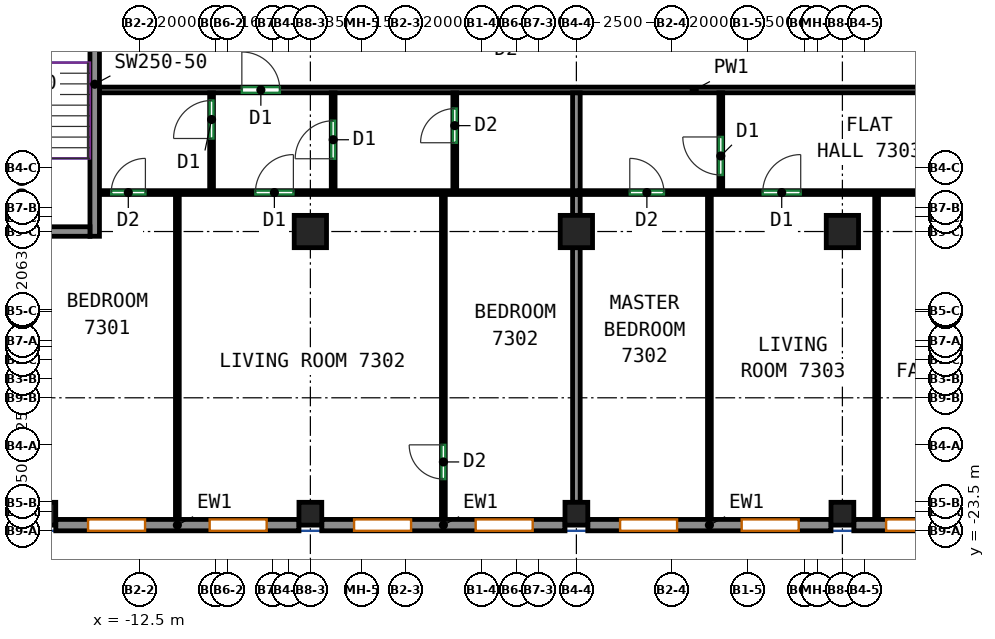
"""IFC4 building model, lengths in metres.
Left out: names, types, materials, properties, quantities, classifications, styles, units other than length and angle.
Written with IfcOpenShell. Run it as: python <this file> out.ifc"""

import sys

from ifc_helpers import new_model, si_unit, direction, frame, frame_2d, origin, origin_2d, place, context, subcontext, project, spatial, rectangle, extrude, source, transform, mapped, element, fill, save


model = new_model("IFC4")
c1 = context("Model", 3, precision=1e-05, world=origin(), true_north=direction((0.0, 1.0)))
c2 = subcontext(c1, "Body", "Model", "MODEL_VIEW")
j1 = project(units=[si_unit("LENGTHUNIT", "METRE"), si_unit("PLANEANGLEUNIT", "RADIAN")], contexts=[c1])
p1 = place(None, origin())
s1 = spatial("IfcSite", under=j1, at=p1, CompositionType="ELEMENT")
p2 = place(p1, origin())
s2 = spatial("IfcBuilding", under=s1, at=p2, CompositionType="ELEMENT")
p3 = place(p2, frame((0.0, 0.0, 295.0)))
s3 = spatial("IfcBuildingStorey", under=s2, at=p3, CompositionType="ELEMENT", Elevation=295.0)
m1 = source(origin(), c2, "Body", "SweptSolid", [
    extrude(rectangle(XDim=0.6, YDim=0.6, at=origin_2d()), origin(), (0.0, 0.0, 1.0), 3.12),
])
for number, where, z_axis, x_axis in (
    (1, (-15.0, -23.05, 0.0), (0.0, 0.0, 1.0), (1.0, 0.0, 0.0)),
    (2, (-8.0, -23.05, 0.0), (0.0, 0.0, 1.0), (1.0, 0.0, 0.0)),
):
    element("IfcColumn", number, at=place(p3, frame(where, z_axis=z_axis, x_axis=x_axis)), inside=s3, PredefinedType="COLUMN", context=c2, shape_type="MappedRepresentation", body=[
        mapped(m1, transform((0.0, 0.0, 0.0))),
    ])
m2 = source(origin(), c2, "Body", "SweptSolid", [
    extrude(rectangle(XDim=0.85, YDim=0.85, at=origin_2d()), origin(), (0.0, 0.0, 1.0), 3.12),
])
p4 = place(p3, frame((-8.0, -15.625, 0.0), z_axis=(0.0, 0.0, 1.0), x_axis=(1.0, 0.0, 0.0)))
e3 = element("IfcColumn", 3, at=p4, inside=s3, PredefinedType="COLUMN", context=c2, shape_type="MappedRepresentation", body=[
    mapped(m2, transform((0.0, 0.0, 0.0))),
])
p5 = place(p3, frame((-1.0, -23.05, 0.0), z_axis=(0.0, 0.0, 1.0), x_axis=(1.0, 0.0, 0.0)))
e4 = element("IfcColumn", 4, at=p5, inside=s3, PredefinedType="COLUMN", context=c2, shape_type="MappedRepresentation", body=[
    mapped(m1, transform((0.0, 0.0, 0.0))),
])
p6 = place(p3, frame((-1.0, -15.625, 0.0), z_axis=(0.0, 0.0, 1.0), x_axis=(1.0, 0.0, 0.0)))
e5 = element("IfcColumn", 5, at=p6, inside=s3, PredefinedType="COLUMN", context=c2, shape_type="MappedRepresentation", body=[
    mapped(m2, transform((0.0, 0.0, 0.0))),
])
p7 = place(p3, frame((6.0, -23.05, 0.0), z_axis=(0.0, 0.0, 1.0), x_axis=(1.0, 0.0, 0.0)))
e6 = element("IfcColumn", 6, at=p7, inside=s3, PredefinedType="COLUMN", context=c2, shape_type="MappedRepresentation", body=[
    mapped(m1, transform((0.0, 0.0, 0.0))),
])
p8 = place(p3, frame((6.0, -15.625, 0.0), z_axis=(0.0, 0.0, 1.0), x_axis=(1.0, 0.0, 0.0)))
e7 = element("IfcColumn", 7, at=p8, inside=s3, PredefinedType="COLUMN", context=c2, shape_type="MappedRepresentation", body=[
    mapped(m2, transform((0.0, 0.0, 0.0))),
])
m3 = source(origin(), c2, "Body", "SweptSolid", [
    extrude(rectangle(XDim=8.0, YDim=0.25, at=frame_2d((4.0, 0.0))), origin(), (0.0, 0.0, 1.0), 3.12),
])
p9 = place(p3, frame((-13.675, -15.75, 0.0), z_axis=(0.0, 0.0, 1.0), x_axis=(0.0, 1.0, 0.0)))
e8 = element("IfcWall", 8, at=p9, inside=s3, PredefinedType="SHEAR", context=c2, shape_type="MappedRepresentation", body=[
    mapped(m3, transform((0.0, 0.0, 0.0))),
])
m4 = source(origin(), c2, "Body", "SweptSolid", [
    extrude(rectangle(XDim=3.7, YDim=0.25, at=frame_2d((1.85, 0.0))), origin(), (0.0, 0.0, 1.0), 3.12),
])
p10 = place(p3, frame((-17.5, -15.625, 0.0), z_axis=(0.0, 0.0, 1.0), x_axis=(1.0, 0.0, 0.0)))
e9 = element("IfcWall", 9, at=p10, inside=s3, PredefinedType="SHEAR", context=c2, shape_type="MappedRepresentation", body=[
    mapped(m4, transform((0.0, 0.0, 0.0))),
])
p11 = place(p10, frame((1.25, 0.0, 0.0)))
e10 = element("IfcOpeningElement", 10, at=p11, cuts=e9, PredefinedType="OPENING", context=c2, shape_type="SweptSolid", body=[
    extrude(rectangle(XDim=1.2, YDim=2.1, at=frame_2d((0.6, 1.05))), frame((0.0, 0.135, 0.0), z_axis=(0.0, -1.0, 0.0), x_axis=(1.0, 0.0, 0.0)), (0.0, 0.0, 1.0), 0.27),
])
m5 = source(origin(), c2, "Body", "SweptSolid", [
    extrude(rectangle(XDim=6.4, YDim=0.3, at=frame_2d((3.2, 0.0))), origin(), (0.0, 0.0, 1.0), 3.12),
])
p12 = place(p3, frame((-14.7, -23.35, 0.0), z_axis=(0.0, 0.0, 1.0), x_axis=(1.0, 0.0, 0.0)))
e11 = element("IfcWall", 11, at=p12, inside=s3, PredefinedType="SOLIDWALL", context=c2, shape_type="MappedRepresentation", body=[
    mapped(m5, transform((0.0, 0.0, 0.0))),
])
p13 = place(p12, frame((0.85, 0.0, 0.8)))
e12 = element("IfcOpeningElement", 12, at=p13, cuts=e11, PredefinedType="OPENING", context=c2, shape_type="SweptSolid", body=[
    extrude(rectangle(XDim=1.5, YDim=2.05, at=frame_2d((0.75, 1.025))), frame((0.0, 0.16, 0.0), z_axis=(0.0, -1.0, 0.0), x_axis=(1.0, 0.0, 0.0)), (0.0, 0.0, 1.0), 0.32),
])
p14 = place(p12, frame((4.05, 0.0, 0.8)))
e13 = element("IfcOpeningElement", 13, at=p14, cuts=e11, PredefinedType="OPENING", context=c2, shape_type="SweptSolid", body=[
    extrude(rectangle(XDim=1.5, YDim=2.05, at=frame_2d((0.75, 1.025))), frame((0.0, 0.16, 0.0), z_axis=(0.0, -1.0, 0.0), x_axis=(1.0, 0.0, 0.0)), (0.0, 0.0, 1.0), 0.32),
])
p15 = place(p3, frame((-7.7, -23.35, 0.0), z_axis=(0.0, 0.0, 1.0), x_axis=(1.0, 0.0, 0.0)))
e14 = element("IfcWall", 14, at=p15, inside=s3, PredefinedType="SOLIDWALL", context=c2, shape_type="MappedRepresentation", body=[
    mapped(m5, transform((0.0, 0.0, 0.0))),
])
p16 = place(p15, frame((0.85, 0.0, 0.8)))
e15 = element("IfcOpeningElement", 15, at=p16, cuts=e14, PredefinedType="OPENING", context=c2, shape_type="SweptSolid", body=[
    extrude(rectangle(XDim=1.5, YDim=2.05, at=frame_2d((0.75, 1.025))), frame((0.0, 0.16, 0.0), z_axis=(0.0, -1.0, 0.0), x_axis=(1.0, 0.0, 0.0)), (0.0, 0.0, 1.0), 0.32),
])
p17 = place(p15, frame((4.05, 0.0, 0.8)))
e16 = element("IfcOpeningElement", 16, at=p17, cuts=e14, PredefinedType="OPENING", context=c2, shape_type="SweptSolid", body=[
    extrude(rectangle(XDim=1.5, YDim=2.05, at=frame_2d((0.75, 1.025))), frame((0.0, 0.16, 0.0), z_axis=(0.0, -1.0, 0.0), x_axis=(1.0, 0.0, 0.0)), (0.0, 0.0, 1.0), 0.32),
])
p18 = place(p3, frame((-0.7, -23.35, 0.0), z_axis=(0.0, 0.0, 1.0), x_axis=(1.0, 0.0, 0.0)))
e17 = element("IfcWall", 17, at=p18, inside=s3, PredefinedType="SOLIDWALL", context=c2, shape_type="MappedRepresentation", body=[
    mapped(m5, transform((0.0, 0.0, 0.0))),
])
p19 = place(p18, frame((0.85, 0.0, 0.8)))
e18 = element("IfcOpeningElement", 18, at=p19, cuts=e17, PredefinedType="OPENING", context=c2, shape_type="SweptSolid", body=[
    extrude(rectangle(XDim=1.5, YDim=2.05, at=frame_2d((0.75, 1.025))), frame((0.0, 0.16, 0.0), z_axis=(0.0, -1.0, 0.0), x_axis=(1.0, 0.0, 0.0)), (0.0, 0.0, 1.0), 0.32),
])
p20 = place(p18, frame((4.05, 0.0, 0.8)))
e19 = element("IfcOpeningElement", 19, at=p20, cuts=e17, PredefinedType="OPENING", context=c2, shape_type="SweptSolid", body=[
    extrude(rectangle(XDim=1.5, YDim=2.05, at=frame_2d((0.75, 1.025))), frame((0.0, 0.16, 0.0), z_axis=(0.0, -1.0, 0.0), x_axis=(1.0, 0.0, 0.0)), (0.0, 0.0, 1.0), 0.32),
])
p21 = place(p3, frame((6.3, -23.35, 0.0), z_axis=(0.0, 0.0, 1.0), x_axis=(1.0, 0.0, 0.0)))
e20 = element("IfcWall", 20, at=p21, inside=s3, PredefinedType="SOLIDWALL", context=c2, shape_type="MappedRepresentation", body=[
    mapped(m5, transform((0.0, 0.0, 0.0))),
])
p22 = place(p21, frame((0.85, 0.0, 0.8)))
e21 = element("IfcOpeningElement", 21, at=p22, cuts=e20, PredefinedType="OPENING", context=c2, shape_type="SweptSolid", body=[
    extrude(rectangle(XDim=1.5, YDim=2.05, at=frame_2d((0.75, 1.025))), frame((0.0, 0.16, 0.0), z_axis=(0.0, -1.0, 0.0), x_axis=(1.0, 0.0, 0.0)), (0.0, 0.0, 1.0), 0.32),
])
p23 = place(p21, frame((4.05, 0.0, 0.8)))
e22 = element("IfcOpeningElement", 22, at=p23, cuts=e20, PredefinedType="OPENING", context=c2, shape_type="SweptSolid", body=[
    extrude(rectangle(XDim=1.5, YDim=2.05, at=frame_2d((0.75, 1.025))), frame((0.0, 0.16, 0.0), z_axis=(0.0, -1.0, 0.0), x_axis=(1.0, 0.0, 0.0)), (0.0, 0.0, 1.0), 0.32),
])
p24 = place(p3, frame((-13.55, -11.9, 0.0), z_axis=(0.0, 0.0, 1.0), x_axis=(1.0, 0.0, 0.0)))
e23 = element("IfcWall", 23, at=p24, inside=s3, PredefinedType="PARTITIONING", context=c2, shape_type="SweptSolid", body=[
    extrude(rectangle(XDim=31.3, YDim=0.15, at=frame_2d((15.65, 0.0))), origin(), (0.0, 0.0, 1.0), 3.12),
])
p25 = place(p24, frame((3.747, 0.0, 0.0)))
e24 = element("IfcOpeningElement", 24, at=p25, cuts=e23, PredefinedType="OPENING", context=c2, shape_type="SweptSolid", body=[
    extrude(rectangle(XDim=1.0, YDim=2.1, at=frame_2d((0.5, 1.05))), frame((0.0, 0.085, 0.0), z_axis=(0.0, -1.0, 0.0), x_axis=(1.0, 0.0, 0.0)), (0.0, 0.0, 1.0), 0.17),
])
p26 = place(p24, frame((22.835, 0.0, 0.0)))
e25 = element("IfcOpeningElement", 25, at=p26, cuts=e23, PredefinedType="OPENING", context=c2, shape_type="SweptSolid", body=[
    extrude(rectangle(XDim=1.0, YDim=2.1, at=frame_2d((0.5, 1.05))), frame((0.0, 0.085, 0.0), z_axis=(0.0, -1.0, 0.0), x_axis=(1.0, 0.0, 0.0)), (0.0, 0.0, 1.0), 0.17),
])
p27 = place(p3, frame((-10.6, -14.55, 0.0), z_axis=(0.0, 0.0, 1.0), x_axis=(0.0, 1.0, 0.0)))
e26 = element("IfcWall", 26, at=p27, inside=s3, PredefinedType="PARTITIONING", context=c2, shape_type="SweptSolid", body=[
    extrude(rectangle(XDim=2.573, YDim=0.1, at=frame_2d((1.287, 0.0))), origin(), (0.0, 0.0, 1.0), 3.12),
])
p28 = place(p27, frame((1.373, 0.0, 0.0)))
e27 = element("IfcOpeningElement", 27, at=p28, cuts=e26, PredefinedType="OPENING", context=c2, shape_type="SweptSolid", body=[
    extrude(rectangle(XDim=1.0, YDim=2.1, at=frame_2d((0.5, 1.05))), frame((0.0, 0.06, 0.0), z_axis=(0.0, -1.0, 0.0), x_axis=(1.0, 0.0, 0.0)), (0.0, 0.0, 1.0), 0.12),
])
p29 = place(p3, frame((-13.55, -14.6, 0.0), z_axis=(0.0, 0.0, 1.0), x_axis=(1.0, 0.0, 0.0)))
e28 = element("IfcWall", 28, at=p29, inside=s3, PredefinedType="PARTITIONING", context=c2, shape_type="SweptSolid", body=[
    extrude(rectangle(XDim=31.3, YDim=0.1, at=frame_2d((15.65, 0.0))), origin(), (0.0, 0.0, 1.0), 3.12),
])
p30 = place(p29, frame((0.309, 0.0, 0.0)))
e29 = element("IfcOpeningElement", 29, at=p30, cuts=e28, PredefinedType="OPENING", context=c2, shape_type="SweptSolid", body=[
    extrude(rectangle(XDim=0.9, YDim=2.1, at=frame_2d((0.45, 1.05))), frame((0.0, 0.06, 0.0), z_axis=(0.0, -1.0, 0.0), x_axis=(1.0, 0.0, 0.0)), (0.0, 0.0, 1.0), 0.12),
])
p31 = place(p29, frame((4.103, 0.0, 0.0)))
e30 = element("IfcOpeningElement", 30, at=p31, cuts=e28, PredefinedType="OPENING", context=c2, shape_type="SweptSolid", body=[
    extrude(rectangle(XDim=1.0, YDim=2.1, at=frame_2d((0.5, 1.05))), frame((0.0, 0.06, 0.0), z_axis=(0.0, -1.0, 0.0), x_axis=(1.0, 0.0, 0.0)), (0.0, 0.0, 1.0), 0.12),
])
p32 = place(p29, frame((13.955, 0.0, 0.0)))
e31 = element("IfcOpeningElement", 31, at=p32, cuts=e28, PredefinedType="OPENING", context=c2, shape_type="SweptSolid", body=[
    extrude(rectangle(XDim=0.9, YDim=2.1, at=frame_2d((0.45, 1.05))), frame((0.0, 0.06, 0.0), z_axis=(0.0, -1.0, 0.0), x_axis=(1.0, 0.0, 0.0)), (0.0, 0.0, 1.0), 0.12),
])
p33 = place(p29, frame((17.453, 0.0, 0.0)))
e32 = element("IfcOpeningElement", 32, at=p33, cuts=e28, PredefinedType="OPENING", context=c2, shape_type="SweptSolid", body=[
    extrude(rectangle(XDim=1.0, YDim=2.1, at=frame_2d((0.5, 1.05))), frame((0.0, 0.06, 0.0), z_axis=(0.0, -1.0, 0.0), x_axis=(1.0, 0.0, 0.0)), (0.0, 0.0, 1.0), 0.12),
])
p34 = place(p29, frame((23.13, 0.0, 0.0)))
e33 = element("IfcOpeningElement", 33, at=p34, cuts=e28, PredefinedType="OPENING", context=c2, shape_type="SweptSolid", body=[
    extrude(rectangle(XDim=1.0, YDim=2.1, at=frame_2d((0.5, 1.05))), frame((0.0, 0.06, 0.0), z_axis=(0.0, -1.0, 0.0), x_axis=(1.0, 0.0, 0.0)), (0.0, 0.0, 1.0), 0.12),
])
p35 = place(p3, frame((-7.4, -14.55, 0.0), z_axis=(0.0, 0.0, 1.0), x_axis=(0.0, 1.0, 0.0)))
e34 = element("IfcWall", 34, at=p35, inside=s3, PredefinedType="PARTITIONING", context=c2, shape_type="SweptSolid", body=[
    extrude(rectangle(XDim=2.573, YDim=0.1, at=frame_2d((1.287, 0.0))), origin(), (0.0, 0.0, 1.0), 3.12),
])
p36 = place(p35, frame((0.84, 0.0, 0.0)))
e35 = element("IfcOpeningElement", 35, at=p36, cuts=e34, PredefinedType="OPENING", context=c2, shape_type="SweptSolid", body=[
    extrude(rectangle(XDim=1.0, YDim=2.1, at=frame_2d((0.5, 1.05))), frame((0.0, 0.06, 0.0), z_axis=(0.0, -1.0, 0.0), x_axis=(1.0, 0.0, 0.0)), (0.0, 0.0, 1.0), 0.12),
])
p37 = place(p3, frame((-4.2, -14.55, 0.0), z_axis=(0.0, 0.0, 1.0), x_axis=(0.0, 1.0, 0.0)))
e36 = element("IfcWall", 36, at=p37, inside=s3, PredefinedType="PARTITIONING", context=c2, shape_type="SweptSolid", body=[
    extrude(rectangle(XDim=2.573, YDim=0.1, at=frame_2d((1.287, 0.0))), origin(), (0.0, 0.0, 1.0), 3.12),
])
p38 = place(p37, frame((1.261, 0.0, 0.0)))
e37 = element("IfcOpeningElement", 37, at=p38, cuts=e36, PredefinedType="OPENING", context=c2, shape_type="SweptSolid", body=[
    extrude(rectangle(XDim=0.9, YDim=2.1, at=frame_2d((0.45, 1.05))), frame((0.0, 0.06, 0.0), z_axis=(0.0, -1.0, 0.0), x_axis=(1.0, 0.0, 0.0)), (0.0, 0.0, 1.0), 0.12),
])
p39 = place(p3, frame((-1.0, -14.55, 0.0), z_axis=(0.0, 0.0, 1.0), x_axis=(0.0, 1.0, 0.0)))
e38 = element("IfcWall", 38, at=p39, inside=s3, PredefinedType="PARTITIONING", context=c2, shape_type="SweptSolid", body=[
    extrude(rectangle(XDim=2.573, YDim=0.2, at=frame_2d((1.287, 0.0))), origin(), (0.0, 0.0, 1.0), 3.12),
])
p40 = place(p3, frame((-11.5, -23.25, 0.0), z_axis=(0.0, 0.0, 1.0), x_axis=(0.0, 1.0, 0.0)))
e39 = element("IfcWall", 39, at=p40, inside=s3, PredefinedType="PARTITIONING", context=c2, shape_type="SweptSolid", body=[
    extrude(rectangle(XDim=8.598, YDim=0.1, at=frame_2d((4.299, 0.0))), origin(), (0.0, 0.0, 1.0), 3.12),
])
p41 = place(p3, frame((-4.5, -23.25, 0.0), z_axis=(0.0, 0.0, 1.0), x_axis=(0.0, 1.0, 0.0)))
e40 = element("IfcWall", 40, at=p41, inside=s3, PredefinedType="PARTITIONING", context=c2, shape_type="SweptSolid", body=[
    extrude(rectangle(XDim=8.598, YDim=0.1, at=frame_2d((4.299, 0.0))), origin(), (0.0, 0.0, 1.0), 3.12),
])
p42 = place(p41, frame((1.112, 0.0, 0.0)))
e41 = element("IfcOpeningElement", 41, at=p42, cuts=e40, PredefinedType="OPENING", context=c2, shape_type="SweptSolid", body=[
    extrude(rectangle(XDim=0.9, YDim=2.1, at=frame_2d((0.45, 1.05))), frame((0.0, 0.06, 0.0), z_axis=(0.0, -1.0, 0.0), x_axis=(1.0, 0.0, 0.0)), (0.0, 0.0, 1.0), 0.12),
])
p43 = place(p3, frame((-1.0, -15.2, 0.0), z_axis=(0.0, 0.0, 1.0), x_axis=(0.0, 1.0, 0.0)))
e42 = element("IfcWall", 42, at=p43, inside=s3, PredefinedType="PARTITIONING", context=c2, shape_type="SweptSolid", body=[
    extrude(rectangle(XDim=0.548, YDim=0.2, at=frame_2d((0.274, 0.0))), origin(), (0.0, 0.0, 1.0), 3.12),
])
p44 = place(p3, frame((-1.0, -22.75, 0.0), z_axis=(0.0, 0.0, 1.0), x_axis=(0.0, 1.0, 0.0)))
e43 = element("IfcWall", 43, at=p44, inside=s3, PredefinedType="PARTITIONING", context=c2, shape_type="SweptSolid", body=[
    extrude(rectangle(XDim=6.7, YDim=0.2, at=frame_2d((3.35, 0.0))), origin(), (0.0, 0.0, 1.0), 3.12),
])
p45 = place(p3, frame((2.8, -14.55, 0.0), z_axis=(0.0, 0.0, 1.0), x_axis=(0.0, 1.0, 0.0)))
e44 = element("IfcWall", 44, at=p45, inside=s3, PredefinedType="PARTITIONING", context=c2, shape_type="SweptSolid", body=[
    extrude(rectangle(XDim=2.573, YDim=0.1, at=frame_2d((1.287, 0.0))), origin(), (0.0, 0.0, 1.0), 3.12),
])
p46 = place(p45, frame((0.413, 0.0, 0.0)))
e45 = element("IfcOpeningElement", 45, at=p46, cuts=e44, PredefinedType="OPENING", context=c2, shape_type="SweptSolid", body=[
    extrude(rectangle(XDim=1.0, YDim=2.1, at=frame_2d((0.5, 1.05))), frame((0.0, 0.06, 0.0), z_axis=(0.0, -1.0, 0.0), x_axis=(1.0, 0.0, 0.0)), (0.0, 0.0, 1.0), 0.12),
])
for number, where, z_axis, x_axis in (
    (46, (2.5, -23.25, 0.0), (0.0, 0.0, 1.0), (0.0, 1.0, 0.0)),
    (47, (6.9, -23.25, 0.0), (0.0, 0.0, 1.0), (0.0, 1.0, 0.0)),
):
    element("IfcWall", number, at=place(p3, frame(where, z_axis=z_axis, x_axis=x_axis)), inside=s3, PredefinedType="PARTITIONING", context=c2, shape_type="SweptSolid", body=[
        extrude(rectangle(XDim=8.598, YDim=0.1, at=frame_2d((4.299, 0.0))), origin(), (0.0, 0.0, 1.0), 3.12),
    ])
p47 = place(p13, origin())
e48 = element("IfcWindow", 48, at=p47, inside=s3, PartitioningType="SINGLE_PANEL", PredefinedType="WINDOW", context=c2, shape_type="SweptSolid", body=[
    extrude(rectangle(XDim=1.5, YDim=2.05, at=frame_2d((0.75, 1.025))), frame((0.0, 0.03, 0.0), z_axis=(0.0, -1.0, 0.0), x_axis=(1.0, 0.0, 0.0)), (0.0, 0.0, 1.0), 0.06),
])
fill(e12, e48)
p48 = place(p14, origin())
e49 = element("IfcWindow", 49, at=p48, inside=s3, PartitioningType="SINGLE_PANEL", PredefinedType="WINDOW", context=c2, shape_type="SweptSolid", body=[
    extrude(rectangle(XDim=1.5, YDim=2.05, at=frame_2d((0.75, 1.025))), frame((0.0, 0.03, 0.0), z_axis=(0.0, -1.0, 0.0), x_axis=(1.0, 0.0, 0.0)), (0.0, 0.0, 1.0), 0.06),
])
fill(e13, e49)
p49 = place(p16, origin())
e50 = element("IfcWindow", 50, at=p49, inside=s3, PartitioningType="SINGLE_PANEL", PredefinedType="WINDOW", context=c2, shape_type="SweptSolid", body=[
    extrude(rectangle(XDim=1.5, YDim=2.05, at=frame_2d((0.75, 1.025))), frame((0.0, 0.03, 0.0), z_axis=(0.0, -1.0, 0.0), x_axis=(1.0, 0.0, 0.0)), (0.0, 0.0, 1.0), 0.06),
])
fill(e15, e50)
p50 = place(p17, origin())
e51 = element("IfcWindow", 51, at=p50, inside=s3, PartitioningType="SINGLE_PANEL", PredefinedType="WINDOW", context=c2, shape_type="SweptSolid", body=[
    extrude(rectangle(XDim=1.5, YDim=2.05, at=frame_2d((0.75, 1.025))), frame((0.0, 0.03, 0.0), z_axis=(0.0, -1.0, 0.0), x_axis=(1.0, 0.0, 0.0)), (0.0, 0.0, 1.0), 0.06),
])
fill(e16, e51)
p51 = place(p19, origin())
e52 = element("IfcWindow", 52, at=p51, inside=s3, PartitioningType="SINGLE_PANEL", PredefinedType="WINDOW", context=c2, shape_type="SweptSolid", body=[
    extrude(rectangle(XDim=1.5, YDim=2.05, at=frame_2d((0.75, 1.025))), frame((0.0, 0.03, 0.0), z_axis=(0.0, -1.0, 0.0), x_axis=(1.0, 0.0, 0.0)), (0.0, 0.0, 1.0), 0.06),
])
fill(e18, e52)
p52 = place(p20, origin())
e53 = element("IfcWindow", 53, at=p52, inside=s3, PartitioningType="SINGLE_PANEL", PredefinedType="WINDOW", context=c2, shape_type="SweptSolid", body=[
    extrude(rectangle(XDim=1.5, YDim=2.05, at=frame_2d((0.75, 1.025))), frame((0.0, 0.03, 0.0), z_axis=(0.0, -1.0, 0.0), x_axis=(1.0, 0.0, 0.0)), (0.0, 0.0, 1.0), 0.06),
])
fill(e19, e53)
p53 = place(p22, origin())
e54 = element("IfcWindow", 54, at=p53, inside=s3, PartitioningType="SINGLE_PANEL", PredefinedType="WINDOW", context=c2, shape_type="SweptSolid", body=[
    extrude(rectangle(XDim=1.5, YDim=2.05, at=frame_2d((0.75, 1.025))), frame((0.0, 0.03, 0.0), z_axis=(0.0, -1.0, 0.0), x_axis=(1.0, 0.0, 0.0)), (0.0, 0.0, 1.0), 0.06),
])
fill(e21, e54)
p54 = place(p42, origin())
e55 = element("IfcDoor", 55, at=p54, inside=s3, OperationType="SINGLE_SWING_RIGHT", PredefinedType="DOOR", context=c2, shape_type="SweptSolid", body=[
    extrude(rectangle(XDim=0.9, YDim=2.1, at=frame_2d((0.45, 1.05))), frame((0.0, 0.025, 0.0), z_axis=(0.0, -1.0, 0.0), x_axis=(1.0, 0.0, 0.0)), (0.0, 0.0, 1.0), 0.05),
])
fill(e41, e55)
p55 = place(p30, origin())
e56 = element("IfcDoor", 56, at=p55, inside=s3, OperationType="SINGLE_SWING_RIGHT", PredefinedType="DOOR", context=c2, shape_type="SweptSolid", body=[
    extrude(rectangle(XDim=0.9, YDim=2.1, at=frame_2d((0.45, 1.05))), frame((0.0, 0.025, 0.0), z_axis=(0.0, -1.0, 0.0), x_axis=(1.0, 0.0, 0.0)), (0.0, 0.0, 1.0), 0.05),
])
fill(e29, e56)
p56 = place(p31, origin())
e57 = element("IfcDoor", 57, at=p56, inside=s3, OperationType="SINGLE_SWING_RIGHT", PredefinedType="DOOR", context=c2, shape_type="SweptSolid", body=[
    extrude(rectangle(XDim=1.0, YDim=2.1, at=frame_2d((0.5, 1.05))), frame((0.0, 0.025, 0.0), z_axis=(0.0, -1.0, 0.0), x_axis=(1.0, 0.0, 0.0)), (0.0, 0.0, 1.0), 0.05),
])
fill(e30, e57)
p57 = place(p32, origin())
e58 = element("IfcDoor", 58, at=p57, inside=s3, OperationType="SINGLE_SWING_LEFT", PredefinedType="DOOR", context=c2, shape_type="SweptSolid", body=[
    extrude(rectangle(XDim=0.9, YDim=2.1, at=frame_2d((0.45, 1.05))), frame((0.0, 0.025, 0.0), z_axis=(0.0, -1.0, 0.0), x_axis=(1.0, 0.0, 0.0)), (0.0, 0.0, 1.0), 0.05),
])
fill(e31, e58)
p58 = place(p33, origin())
e59 = element("IfcDoor", 59, at=p58, inside=s3, OperationType="SINGLE_SWING_RIGHT", PredefinedType="DOOR", context=c2, shape_type="SweptSolid", body=[
    extrude(rectangle(XDim=1.0, YDim=2.1, at=frame_2d((0.5, 1.05))), frame((0.0, 0.025, 0.0), z_axis=(0.0, -1.0, 0.0), x_axis=(1.0, 0.0, 0.0)), (0.0, 0.0, 1.0), 0.05),
])
fill(e32, e59)
p59 = place(p46, origin())
e60 = element("IfcDoor", 60, at=p59, inside=s3, OperationType="SINGLE_SWING_RIGHT", PredefinedType="DOOR", context=c2, shape_type="SweptSolid", body=[
    extrude(rectangle(XDim=1.0, YDim=2.1, at=frame_2d((0.5, 1.05))), frame((0.0, 0.025, 0.0), z_axis=(0.0, -1.0, 0.0), x_axis=(1.0, 0.0, 0.0)), (0.0, 0.0, 1.0), 0.05),
])
fill(e45, e60)
p60 = place(p36, origin())
e61 = element("IfcDoor", 61, at=p60, inside=s3, OperationType="SINGLE_SWING_LEFT", PredefinedType="DOOR", context=c2, shape_type="SweptSolid", body=[
    extrude(rectangle(XDim=1.0, YDim=2.1, at=frame_2d((0.5, 1.05))), frame((0.0, 0.025, 0.0), z_axis=(0.0, -1.0, 0.0), x_axis=(1.0, 0.0, 0.0)), (0.0, 0.0, 1.0), 0.05),
])
fill(e35, e61)
p61 = place(p38, origin())
e62 = element("IfcDoor", 62, at=p61, inside=s3, OperationType="SINGLE_SWING_LEFT", PredefinedType="DOOR", context=c2, shape_type="SweptSolid", body=[
    extrude(rectangle(XDim=0.9, YDim=2.1, at=frame_2d((0.45, 1.05))), frame((0.0, 0.025, 0.0), z_axis=(0.0, -1.0, 0.0), x_axis=(1.0, 0.0, 0.0)), (0.0, 0.0, 1.0), 0.05),
])
fill(e37, e62)
p62 = place(p28, origin())
e63 = element("IfcDoor", 63, at=p62, inside=s3, OperationType="SINGLE_SWING_LEFT", PredefinedType="DOOR", context=c2, shape_type="SweptSolid", body=[
    extrude(rectangle(XDim=1.0, YDim=2.1, at=frame_2d((0.5, 1.05))), frame((0.0, 0.025, 0.0), z_axis=(0.0, -1.0, 0.0), x_axis=(1.0, 0.0, 0.0)), (0.0, 0.0, 1.0), 0.05),
])
fill(e27, e63)
p63 = place(p25, origin())
e64 = element("IfcDoor", 64, at=p63, inside=s3, OperationType="SINGLE_SWING_LEFT", PredefinedType="DOOR", context=c2, shape_type="SweptSolid", body=[
    extrude(rectangle(XDim=1.0, YDim=2.1, at=frame_2d((0.5, 1.05))), frame((0.0, 0.025, 0.0), z_axis=(0.0, -1.0, 0.0), x_axis=(1.0, 0.0, 0.0)), (0.0, 0.0, 1.0), 0.05),
])
fill(e24, e64)
save(model, sys.argv[1])
